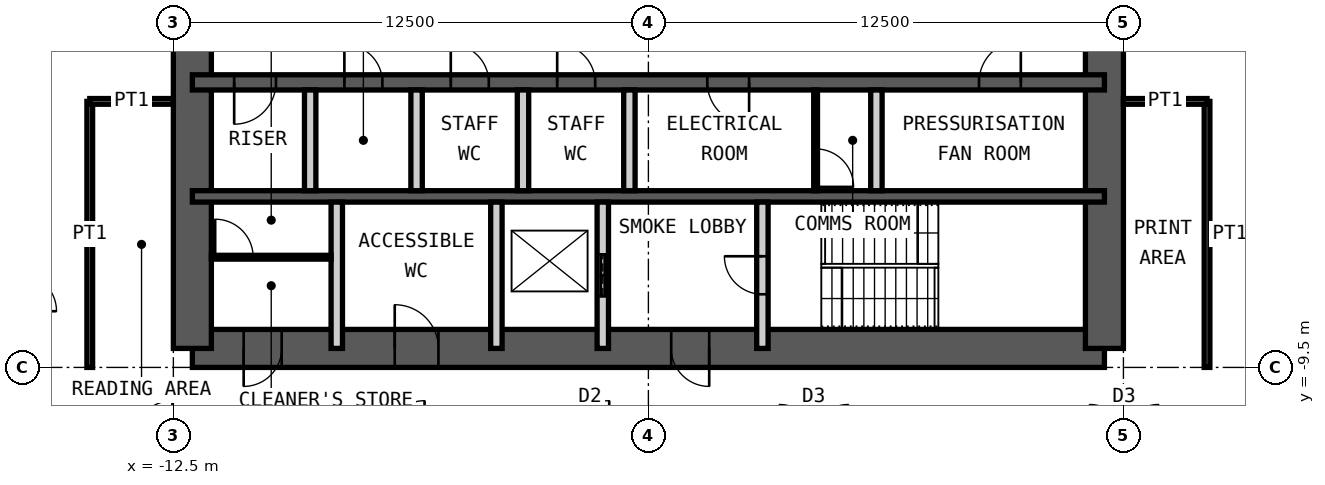
"""IFC4 building model, lengths in metres.
Left out: names, types, materials, properties, quantities, classifications, styles, units other than length and angle.
Written with IfcOpenShell. Run it as: python <this file> out.ifc"""

import sys

from ifc_helpers import new_model, si_unit, direction, frame, frame_2d, origin, place, context, subcontext, project, spatial, rectangle, extrude, element, fill, save


model = new_model("IFC4")
c1 = context("Model", 3, precision=1e-05, world=origin(), true_north=direction((0.0, 1.0)))
c2 = subcontext(c1, "Body", "Model", "MODEL_VIEW")
j1 = project(units=[si_unit("LENGTHUNIT", "METRE"), si_unit("PLANEANGLEUNIT", "RADIAN")], contexts=[c1])
p1 = place(None, origin())
s1 = spatial("IfcSite", under=j1, at=p1, CompositionType="ELEMENT")
p2 = place(p1, origin())
s2 = spatial("IfcBuilding", under=s1, at=p2, CompositionType="ELEMENT")
p3 = place(p2, frame((0.0, 0.0, 299.8)))
s3 = spatial("IfcBuildingStorey", under=s2, at=p3, CompositionType="ELEMENT", Elevation=299.8)
p4 = place(p3, frame((-12.0, -9.0, 0.0), z_axis=(0.0, 0.0, 1.0), x_axis=(1.0, 0.0, 0.0)))
e1 = element("IfcWall", 1, at=p4, inside=s3, PredefinedType="SHEAR", context=c2, shape_type="SweptSolid", body=[
    extrude(rectangle(XDim=24.0, YDim=1.0, at=frame_2d((12.0, 0.0))), origin(), (0.0, 0.0, 1.0), 4.2),
])
p5 = place(p4, frame((1.35, 0.0, 0.0)))
e2 = element("IfcOpeningElement", 2, at=p5, cuts=e1, PredefinedType="OPENING", context=c2, shape_type="SweptSolid", body=[
    extrude(rectangle(XDim=1.0, YDim=2.1, at=frame_2d((0.5, 1.05))), frame((0.0, 0.51, 0.0), z_axis=(0.0, -1.0, 0.0), x_axis=(1.0, 0.0, 0.0)), (0.0, 0.0, 1.0), 1.02),
])
p6 = place(p4, frame((5.325, 0.0, 0.0)))
e3 = element("IfcOpeningElement", 3, at=p6, cuts=e1, PredefinedType="OPENING", context=c2, shape_type="SweptSolid", body=[
    extrude(rectangle(XDim=1.15, YDim=2.1, at=frame_2d((0.575, 1.05))), frame((0.0, 0.51, 0.0), z_axis=(0.0, -1.0, 0.0), x_axis=(1.0, 0.0, 0.0)), (0.0, 0.0, 1.0), 1.02),
])
p7 = place(p4, frame((12.6, 0.0, 0.0)))
e4 = element("IfcOpeningElement", 4, at=p7, cuts=e1, PredefinedType="OPENING", context=c2, shape_type="SweptSolid", body=[
    extrude(rectangle(XDim=1.0, YDim=2.1, at=frame_2d((0.5, 1.05))), frame((0.0, 0.51, 0.0), z_axis=(0.0, -1.0, 0.0), x_axis=(1.0, 0.0, 0.0)), (0.0, 0.0, 1.0), 1.02),
])
p8 = place(p3, frame((12.0, -9.0, 0.0), z_axis=(0.0, 0.0, 1.0), x_axis=(0.0, 1.0, 0.0)))
e5 = element("IfcWall", 5, at=p8, inside=s3, PredefinedType="SHEAR", context=c2, shape_type="SweptSolid", body=[
    extrude(rectangle(XDim=18.0, YDim=1.0, at=frame_2d((9.0, 0.0))), origin(), (0.0, 0.0, 1.0), 4.2),
])
p9 = place(p8, frame((8.1, 0.0, 0.0)))
e6 = element("IfcOpeningElement", 6, at=p9, cuts=e5, PredefinedType="OPENING", context=c2, shape_type="SweptSolid", body=[
    extrude(rectangle(XDim=1.8, YDim=2.1, at=frame_2d((0.9, 1.05))), frame((0.0, 0.51, 0.0), z_axis=(0.0, -1.0, 0.0), x_axis=(1.0, 0.0, 0.0)), (0.0, 0.0, 1.0), 1.02),
])
p10 = place(p3, frame((-12.0, -9.0, 0.0), z_axis=(0.0, 0.0, 1.0), x_axis=(0.0, 1.0, 0.0)))
e7 = element("IfcWall", 7, at=p10, inside=s3, PredefinedType="SHEAR", context=c2, shape_type="SweptSolid", body=[
    extrude(rectangle(XDim=18.0, YDim=1.0, at=frame_2d((9.0, 0.0))), origin(), (0.0, 0.0, 1.0), 4.2),
])
p11 = place(p10, frame((8.1, 0.0, 0.0)))
e8 = element("IfcOpeningElement", 8, at=p11, cuts=e7, PredefinedType="OPENING", context=c2, shape_type="SweptSolid", body=[
    extrude(rectangle(XDim=1.8, YDim=2.1, at=frame_2d((0.9, 1.05))), frame((0.0, 0.51, 0.0), z_axis=(0.0, -1.0, 0.0), x_axis=(1.0, 0.0, 0.0)), (0.0, 0.0, 1.0), 1.02),
])
p12 = place(p3, frame((-12.0, -2.0, 0.0), z_axis=(0.0, 0.0, 1.0), x_axis=(1.0, 0.0, 0.0)))
e9 = element("IfcWall", 9, at=p12, inside=s3, PredefinedType="SHEAR", context=c2, shape_type="SweptSolid", body=[
    extrude(rectangle(XDim=24.0, YDim=0.4, at=frame_2d((12.0, 0.0))), origin(), (0.0, 0.0, 1.0), 4.2),
])
p13 = place(p12, frame((1.1, 0.0, 0.0)))
e10 = element("IfcOpeningElement", 10, at=p13, cuts=e9, PredefinedType="OPENING", context=c2, shape_type="SweptSolid", body=[
    extrude(rectangle(XDim=1.1, YDim=2.1, at=frame_2d((0.55, 1.05))), frame((0.0, 0.21, 0.0), z_axis=(0.0, -1.0, 0.0), x_axis=(1.0, 0.0, 0.0)), (0.0, 0.0, 1.0), 0.42),
])
p14 = place(p12, frame((13.55, 0.0, 0.0)))
e11 = element("IfcOpeningElement", 11, at=p14, cuts=e9, PredefinedType="OPENING", context=c2, shape_type="SweptSolid", body=[
    extrude(rectangle(XDim=1.1, YDim=2.1, at=frame_2d((0.55, 1.05))), frame((0.0, 0.21, 0.0), z_axis=(0.0, -1.0, 0.0), x_axis=(1.0, 0.0, 0.0)), (0.0, 0.0, 1.0), 0.42),
])
p15 = place(p12, frame((20.7, 0.0, 0.0)))
e12 = element("IfcOpeningElement", 12, at=p15, cuts=e9, PredefinedType="OPENING", context=c2, shape_type="SweptSolid", body=[
    extrude(rectangle(XDim=1.1, YDim=2.1, at=frame_2d((0.55, 1.05))), frame((0.0, 0.21, 0.0), z_axis=(0.0, -1.0, 0.0), x_axis=(1.0, 0.0, 0.0)), (0.0, 0.0, 1.0), 0.42),
])
p16 = place(p12, frame((4.0, 0.0, 0.0)))
e13 = element("IfcOpeningElement", 13, at=p16, cuts=e9, PredefinedType="OPENING", context=c2, shape_type="SweptSolid", body=[
    extrude(rectangle(XDim=1.0, YDim=2.1, at=frame_2d((0.5, 1.05))), frame((0.0, 0.21, 0.0), z_axis=(0.0, -1.0, 0.0), x_axis=(1.0, 0.0, 0.0)), (0.0, 0.0, 1.0), 0.42),
])
p17 = place(p12, frame((6.8, 0.0, 0.0)))
e14 = element("IfcOpeningElement", 14, at=p17, cuts=e9, PredefinedType="OPENING", context=c2, shape_type="SweptSolid", body=[
    extrude(rectangle(XDim=1.0, YDim=2.1, at=frame_2d((0.5, 1.05))), frame((0.0, 0.21, 0.0), z_axis=(0.0, -1.0, 0.0), x_axis=(1.0, 0.0, 0.0)), (0.0, 0.0, 1.0), 0.42),
])
p18 = place(p12, frame((9.6, 0.0, 0.0)))
e15 = element("IfcOpeningElement", 15, at=p18, cuts=e9, PredefinedType="OPENING", context=c2, shape_type="SweptSolid", body=[
    extrude(rectangle(XDim=1.0, YDim=2.1, at=frame_2d((0.5, 1.05))), frame((0.0, 0.21, 0.0), z_axis=(0.0, -1.0, 0.0), x_axis=(1.0, 0.0, 0.0)), (0.0, 0.0, 1.0), 0.42),
])
p19 = place(p3, frame((-12.0, -5.0, 0.0), z_axis=(0.0, 0.0, 1.0), x_axis=(1.0, 0.0, 0.0)))
e16 = element("IfcWall", 16, at=p19, inside=s3, PredefinedType="SHEAR", context=c2, shape_type="SweptSolid", body=[
    extrude(rectangle(XDim=24.0, YDim=0.3, at=frame_2d((12.0, 0.0))), origin(), (0.0, 0.0, 1.0), 4.2),
])
for number, where, z_axis, x_axis in (
    (17, (-8.9, -4.85, 0.0), (0.0, 0.0, 1.0), (0.0, 1.0, 0.0)),
    (18, (-6.1, -4.85, 0.0), (0.0, 0.0, 1.0), (0.0, 1.0, 0.0)),
    (19, (-3.3, -4.85, 0.0), (0.0, 0.0, 1.0), (0.0, 1.0, 0.0)),
    (20, (-0.5, -4.85, 0.0), (0.0, 0.0, 1.0), (0.0, 1.0, 0.0)),
    (21, (6.0, -4.85, 0.0), (0.0, 0.0, 1.0), (0.0, 1.0, 0.0)),
):
    element("IfcWall", number, at=place(p3, frame(where, z_axis=z_axis, x_axis=x_axis)), inside=s3, PredefinedType="PARTITIONING", context=c2, shape_type="SweptSolid", body=[
        extrude(rectangle(XDim=2.65, YDim=0.3, at=frame_2d((1.325, 0.0))), origin(), (0.0, 0.0, 1.0), 3.98),
    ])
for number, where, z_axis, x_axis in (
    (22, (-8.2, -9.0, 0.0), (0.0, 0.0, 1.0), (0.0, 1.0, 0.0)),
    (23, (-4.0, -9.0, 0.0), (0.0, 0.0, 1.0), (0.0, 1.0, 0.0)),
):
    element("IfcWall", number, at=place(p3, frame(where, z_axis=z_axis, x_axis=x_axis)), inside=s3, PredefinedType="PARTITIONING", context=c2, shape_type="SweptSolid", body=[
        extrude(rectangle(XDim=3.85, YDim=0.3, at=frame_2d((1.925, 0.0))), origin(), (0.0, 0.0, 1.0), 3.98),
    ])
p20 = place(p3, frame((-1.2, -9.0, 0.0), z_axis=(0.0, 0.0, 1.0), x_axis=(0.0, 1.0, 0.0)))
e24 = element("IfcWall", 24, at=p20, inside=s3, PredefinedType="PARTITIONING", context=c2, shape_type="SweptSolid", body=[
    extrude(rectangle(XDim=3.85, YDim=0.3, at=frame_2d((1.925, 0.0))), origin(), (0.0, 0.0, 1.0), 3.98),
])
p21 = place(p20, frame((1.375, 0.0, 0.0)))
e25 = element("IfcOpeningElement", 25, at=p21, cuts=e24, PredefinedType="OPENING", context=c2, shape_type="SweptSolid", body=[
    extrude(rectangle(XDim=1.1, YDim=2.4, at=frame_2d((0.55, 1.2))), frame((0.0, 0.16, 0.0), z_axis=(0.0, -1.0, 0.0), x_axis=(1.0, 0.0, 0.0)), (0.0, 0.0, 1.0), 0.32),
])
p22 = place(p3, frame((3.0, -9.0, 0.0), z_axis=(0.0, 0.0, 1.0), x_axis=(0.0, 1.0, 0.0)))
e26 = element("IfcWall", 26, at=p22, inside=s3, PredefinedType="PARTITIONING", context=c2, shape_type="SweptSolid", body=[
    extrude(rectangle(XDim=3.85, YDim=0.3, at=frame_2d((1.925, 0.0))), origin(), (0.0, 0.0, 1.0), 3.98),
])
p23 = place(p22, frame((1.425, 0.0, 0.0)))
e27 = element("IfcOpeningElement", 27, at=p23, cuts=e26, PredefinedType="OPENING", context=c2, shape_type="SweptSolid", body=[
    extrude(rectangle(XDim=1.0, YDim=2.1, at=frame_2d((0.5, 1.05))), frame((0.0, 0.16, 0.0), z_axis=(0.0, -1.0, 0.0), x_axis=(1.0, 0.0, 0.0)), (0.0, 0.0, 1.0), 0.32),
])
p24 = place(p3, frame((4.4, -4.85, 0.0), z_axis=(0.0, 0.0, 1.0), x_axis=(0.0, 1.0, 0.0)))
e28 = element("IfcWall", 28, at=p24, inside=s3, PredefinedType="PARTITIONING", context=c2, shape_type="SweptSolid", body=[
    extrude(rectangle(XDim=2.65, YDim=0.1, at=frame_2d((1.325, 0.0))), origin(), (0.0, 0.0, 1.0), 3.98),
])
p25 = place(p24, frame((0.1, 0.0, 0.0)))
e29 = element("IfcOpeningElement", 29, at=p25, cuts=e28, PredefinedType="OPENING", context=c2, shape_type="SweptSolid", body=[
    extrude(rectangle(XDim=1.0, YDim=2.4, at=frame_2d((0.5, 1.2))), frame((0.0, 0.06, 0.0), z_axis=(0.0, -1.0, 0.0), x_axis=(1.0, 0.0, 0.0)), (0.0, 0.0, 1.0), 0.12),
])
p26 = place(p3, frame((-11.5, -6.6, 0.0), z_axis=(0.0, 0.0, 1.0), x_axis=(1.0, 0.0, 0.0)))
e30 = element("IfcWall", 30, at=p26, inside=s3, PredefinedType="PARTITIONING", context=c2, shape_type="SweptSolid", body=[
    extrude(rectangle(XDim=3.15, YDim=0.1, at=frame_2d((1.575, 0.0))), origin(), (0.0, 0.0, 1.0), 3.98),
])
p27 = place(p26, frame((0.1, 0.0, 0.0)))
e31 = element("IfcOpeningElement", 31, at=p27, cuts=e30, PredefinedType="OPENING", context=c2, shape_type="SweptSolid", body=[
    extrude(rectangle(XDim=1.0, YDim=2.4, at=frame_2d((0.5, 1.2))), frame((0.0, 0.06, 0.0), z_axis=(0.0, -1.0, 0.0), x_axis=(1.0, 0.0, 0.0)), (0.0, 0.0, 1.0), 0.12),
])
p28 = place(p3, frame((14.7, -9.5, 0.0), z_axis=(0.0, 0.0, 1.0), x_axis=(0.0, 1.0, 0.0)))
e32 = element("IfcWall", 32, at=p28, inside=s3, PredefinedType="PARTITIONING", context=c2, shape_type="SweptSolid", body=[
    extrude(rectangle(XDim=7.0, YDim=0.15, at=frame_2d((3.5, 0.0))), origin(), (0.0, 0.0, 1.0), 4.03),
])
p29 = place(p3, frame((12.5, -2.5, 0.0), z_axis=(0.0, 0.0, 1.0), x_axis=(1.0, 0.0, 0.0)))
e33 = element("IfcWall", 33, at=p29, inside=s3, PredefinedType="PARTITIONING", context=c2, shape_type="SweptSolid", body=[
    extrude(rectangle(XDim=2.2, YDim=0.15, at=frame_2d((1.1, 0.0))), origin(), (0.0, 0.0, 1.0), 2.93),
])
p30 = place(p3, frame((-14.7, -9.5, 0.0), z_axis=(0.0, 0.0, 1.0), x_axis=(0.0, 1.0, 0.0)))
e34 = element("IfcWall", 34, at=p30, inside=s3, PredefinedType="PARTITIONING", context=c2, shape_type="SweptSolid", body=[
    extrude(rectangle(XDim=7.0, YDim=0.15, at=frame_2d((3.5, 0.0))), origin(), (0.0, 0.0, 1.0), 4.03),
])
p31 = place(p3, frame((-12.5, -2.5, 0.0), z_axis=(0.0, 0.0, 1.0), x_axis=(-1.0, 0.0, 0.0)))
e35 = element("IfcWall", 35, at=p31, inside=s3, PredefinedType="PARTITIONING", context=c2, shape_type="SweptSolid", body=[
    extrude(rectangle(XDim=2.2, YDim=0.15, at=frame_2d((1.1, 0.0))), origin(), (0.0, 0.0, 1.0), 3.13),
])
p32 = place(p5, origin())
e36 = element("IfcDoor", 36, at=p32, inside=s3, OperationType="SINGLE_SWING_LEFT", PredefinedType="DOOR", context=c2, shape_type="SweptSolid", body=[
    extrude(rectangle(XDim=1.0, YDim=2.1, at=frame_2d((0.5, 1.05))), frame((0.0, 0.025, 0.0), z_axis=(0.0, -1.0, 0.0), x_axis=(1.0, 0.0, 0.0)), (0.0, 0.0, 1.0), 0.05),
])
fill(e2, e36)
p33 = place(p6, origin())
e37 = element("IfcDoor", 37, at=p33, inside=s3, OperationType="SINGLE_SWING_RIGHT", PredefinedType="DOOR", context=c2, shape_type="SweptSolid", body=[
    extrude(rectangle(XDim=1.15, YDim=2.1, at=frame_2d((0.575, 1.05))), frame((0.0, 0.025, 0.0), z_axis=(0.0, -1.0, 0.0), x_axis=(1.0, 0.0, 0.0)), (0.0, 0.0, 1.0), 0.05),
])
fill(e3, e37)
p34 = place(p7, origin())
e38 = element("IfcDoor", 38, at=p34, inside=s3, OperationType="SINGLE_SWING_RIGHT", PredefinedType="DOOR", context=c2, shape_type="SweptSolid", body=[
    extrude(rectangle(XDim=1.0, YDim=2.1, at=frame_2d((0.5, 1.05))), frame((0.0, 0.025, 0.0), z_axis=(0.0, -1.0, 0.0), x_axis=(1.0, 0.0, 0.0)), (0.0, 0.0, 1.0), 0.05),
])
fill(e4, e38)
p35 = place(p23, origin())
e39 = element("IfcDoor", 39, at=p35, inside=s3, OperationType="SINGLE_SWING_LEFT", PredefinedType="DOOR", context=c2, shape_type="SweptSolid", body=[
    extrude(rectangle(XDim=1.0, YDim=2.1, at=frame_2d((0.5, 1.05))), frame((0.0, 0.025, 0.0), z_axis=(0.0, -1.0, 0.0), x_axis=(1.0, 0.0, 0.0)), (0.0, 0.0, 1.0), 0.05),
])
fill(e27, e39)
p36 = place(p13, origin())
e40 = element("IfcDoor", 40, at=p36, inside=s3, OperationType="SINGLE_SWING_LEFT", PredefinedType="DOOR", context=c2, shape_type="SweptSolid", body=[
    extrude(rectangle(XDim=1.1, YDim=2.1, at=frame_2d((0.55, 1.05))), frame((0.0, 0.025, 0.0), z_axis=(0.0, -1.0, 0.0), x_axis=(1.0, 0.0, 0.0)), (0.0, 0.0, 1.0), 0.05),
])
fill(e10, e40)
p37 = place(p14, origin())
e41 = element("IfcDoor", 41, at=p37, inside=s3, OperationType="SINGLE_SWING_RIGHT", PredefinedType="DOOR", context=c2, shape_type="SweptSolid", body=[
    extrude(rectangle(XDim=1.1, YDim=2.1, at=frame_2d((0.55, 1.05))), frame((0.0, 0.025, 0.0), z_axis=(0.0, -1.0, 0.0), x_axis=(1.0, 0.0, 0.0)), (0.0, 0.0, 1.0), 0.05),
])
fill(e11, e41)
p38 = place(p15, origin())
e42 = element("IfcDoor", 42, at=p38, inside=s3, OperationType="SINGLE_SWING_LEFT", PredefinedType="DOOR", context=c2, shape_type="SweptSolid", body=[
    extrude(rectangle(XDim=1.1, YDim=2.1, at=frame_2d((0.55, 1.05))), frame((0.0, 0.025, 0.0), z_axis=(0.0, -1.0, 0.0), x_axis=(1.0, 0.0, 0.0)), (0.0, 0.0, 1.0), 0.05),
])
fill(e12, e42)
p39 = place(p21, origin())
e43 = element("IfcDoor", 43, at=p39, inside=s3, OperationType="DOUBLE_DOOR_SLIDING", PredefinedType="DOOR", context=c2, shape_type="SweptSolid", body=[
    extrude(rectangle(XDim=1.1, YDim=2.4, at=frame_2d((0.55, 1.2))), frame((0.0, 0.025, 0.0), z_axis=(0.0, -1.0, 0.0), x_axis=(1.0, 0.0, 0.0)), (0.0, 0.0, 1.0), 0.05),
])
fill(e25, e43)
p40 = place(p16, origin())
e44 = element("IfcDoor", 44, at=p40, inside=s3, OperationType="SINGLE_SWING_RIGHT", PredefinedType="DOOR", context=c2, shape_type="SweptSolid", body=[
    extrude(rectangle(XDim=1.0, YDim=2.1, at=frame_2d((0.5, 1.05))), frame((0.0, 0.025, 0.0), z_axis=(0.0, -1.0, 0.0), x_axis=(1.0, 0.0, 0.0)), (0.0, 0.0, 1.0), 0.05),
])
fill(e13, e44)
p41 = place(p17, origin())
e45 = element("IfcDoor", 45, at=p41, inside=s3, OperationType="SINGLE_SWING_RIGHT", PredefinedType="DOOR", context=c2, shape_type="SweptSolid", body=[
    extrude(rectangle(XDim=1.0, YDim=2.1, at=frame_2d((0.5, 1.05))), frame((0.0, 0.025, 0.0), z_axis=(0.0, -1.0, 0.0), x_axis=(1.0, 0.0, 0.0)), (0.0, 0.0, 1.0), 0.05),
])
fill(e14, e45)
p42 = place(p18, origin())
e46 = element("IfcDoor", 46, at=p42, inside=s3, OperationType="SINGLE_SWING_RIGHT", PredefinedType="DOOR", context=c2, shape_type="SweptSolid", body=[
    extrude(rectangle(XDim=1.0, YDim=2.1, at=frame_2d((0.5, 1.05))), frame((0.0, 0.025, 0.0), z_axis=(0.0, -1.0, 0.0), x_axis=(1.0, 0.0, 0.0)), (0.0, 0.0, 1.0), 0.05),
])
fill(e15, e46)
p43 = place(p25, origin())
e47 = element("IfcDoor", 47, at=p43, inside=s3, OperationType="SINGLE_SWING_LEFT", PredefinedType="DOOR", context=c2, shape_type="SweptSolid", body=[
    extrude(rectangle(XDim=1.0, YDim=2.4, at=frame_2d((0.5, 1.2))), frame((0.0, 0.025, 0.0), z_axis=(0.0, -1.0, 0.0), x_axis=(1.0, 0.0, 0.0)), (0.0, 0.0, 1.0), 0.05),
])
fill(e29, e47)
p44 = place(p27, origin())
e48 = element("IfcDoor", 48, at=p44, inside=s3, OperationType="SINGLE_SWING_RIGHT", PredefinedType="DOOR", context=c2, shape_type="SweptSolid", body=[
    extrude(rectangle(XDim=1.0, YDim=2.4, at=frame_2d((0.5, 1.2))), frame((0.0, 0.025, 0.0), z_axis=(0.0, -1.0, 0.0), x_axis=(1.0, 0.0, 0.0)), (0.0, 0.0, 1.0), 0.05),
])
fill(e31, e48)
save(model, sys.argv[1])
